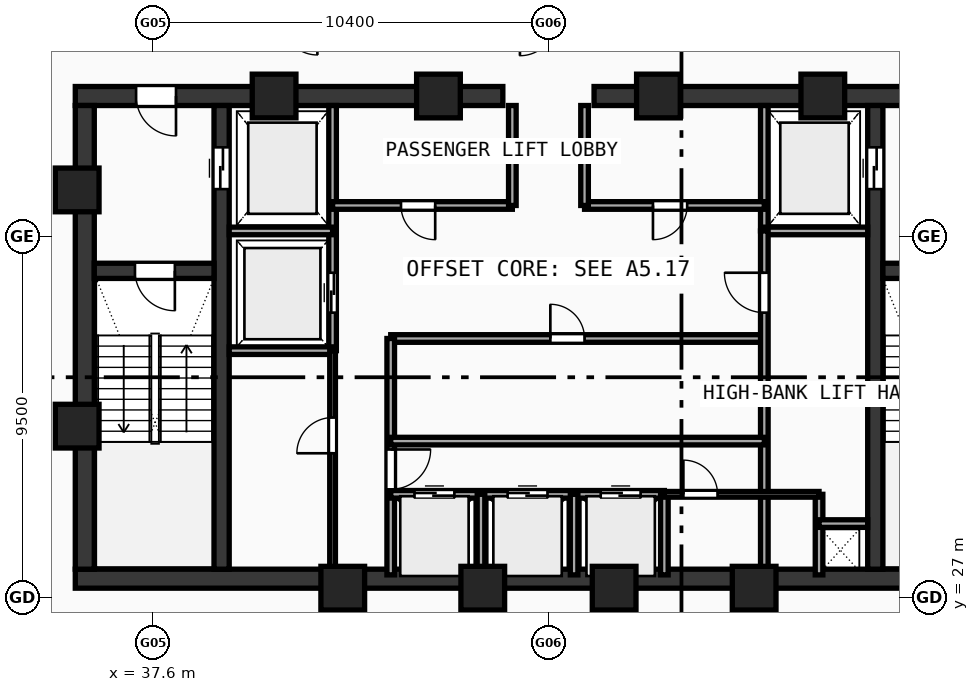
"""IFC4 building model, lengths in metres.
Left out: names, types, materials, properties, quantities, classifications, styles, units other than length and angle.
Written with IfcOpenShell. Run it as: python <this file> out.ifc"""

import sys

from ifc_helpers import new_model, si_unit, direction, frame, frame_2d, origin, origin_with_axes, origin_2d, place, context, subcontext, project, spatial, rectangle, hollow_rectangle, extrude, source, transform, mapped, element, fill, save


model = new_model("IFC4")
c1 = context("Model", 3, precision=1e-05, world=origin(), true_north=direction((0.0, 1.0)))
c2 = subcontext(c1, "Body", "Model", "MODEL_VIEW")
j1 = project(units=[si_unit("LENGTHUNIT", "METRE"), si_unit("PLANEANGLEUNIT", "RADIAN")], contexts=[c1])
p1 = place(None, origin())
s1 = spatial("IfcSite", under=j1, at=p1, CompositionType="ELEMENT")
p2 = place(p1, origin())
s2 = spatial("IfcBuilding", under=s1, at=p2, CompositionType="ELEMENT")
p3 = place(p2, frame((0.0, 0.0, 259.45)))
s3 = spatial("IfcBuildingStorey", under=s2, at=p3, CompositionType="ELEMENT", Elevation=259.45)
p4 = place(p3, frame((35.55, 27.5, 0.0), z_axis=(0.0, 0.0, 1.0), x_axis=(1.0, 0.0, 0.0)))
e1 = element("IfcWall", 1, at=p4, inside=s3, PredefinedType="SHEAR", context=c2, shape_type="SweptSolid", body=[
    extrude(rectangle(XDim=24.9, YDim=0.5, at=frame_2d((12.45, 0.0))), origin(), (0.0, 0.0, 1.0), 3.47),
])
p5 = place(p3, frame((35.55, 40.2, 0.0), z_axis=(0.0, 0.0, 1.0), x_axis=(1.0, 0.0, 0.0)))
e2 = element("IfcWall", 2, at=p5, inside=s3, PredefinedType="SHEAR", context=c2, shape_type="SweptSolid", body=[
    extrude(rectangle(XDim=11.25, YDim=0.5, at=frame_2d((5.625, 0.0))), origin(), (0.0, 0.0, 1.0), 3.47),
])
p6 = place(p5, frame((1.6, 0.0, 0.0)))
e3 = element("IfcOpeningElement", 3, at=p6, cuts=e2, PredefinedType="OPENING", context=c2, shape_type="SweptSolid", body=[
    extrude(rectangle(XDim=1.05, YDim=2.1, at=frame_2d((0.525, 1.05))), frame((0.0, 0.26, 0.0), z_axis=(0.0, -1.0, 0.0), x_axis=(1.0, 0.0, 0.0)), (0.0, 0.0, 1.0), 0.52),
])
p7 = place(p3, frame((49.2, 40.2, 0.0), z_axis=(0.0, 0.0, 1.0), x_axis=(1.0, 0.0, 0.0)))
e4 = element("IfcWall", 4, at=p7, inside=s3, PredefinedType="SHEAR", context=c2, shape_type="SweptSolid", body=[
    extrude(rectangle(XDim=11.25, YDim=0.5, at=frame_2d((5.625, 0.0))), origin(), (0.0, 0.0, 1.0), 3.47),
])
p8 = place(p7, frame((8.6, 0.0, 0.0)))
e5 = element("IfcOpeningElement", 5, at=p8, cuts=e4, PredefinedType="OPENING", context=c2, shape_type="SweptSolid", body=[
    extrude(rectangle(XDim=1.05, YDim=2.1, at=frame_2d((0.525, 1.05))), frame((0.0, 0.26, 0.0), z_axis=(0.0, -1.0, 0.0), x_axis=(1.0, 0.0, 0.0)), (0.0, 0.0, 1.0), 0.52),
])
p9 = place(p3, frame((35.8, 27.75, 0.0), z_axis=(0.0, 0.0, 1.0), x_axis=(0.0, 1.0, 0.0)))
e6 = element("IfcWall", 6, at=p9, inside=s3, PredefinedType="SHEAR", context=c2, shape_type="SweptSolid", body=[
    extrude(rectangle(XDim=12.2, YDim=0.5, at=frame_2d((6.1, 0.0))), origin(), (0.0, 0.0, 1.0), 3.47),
])
p10 = place(p3, frame((39.4, 27.75, 0.0), z_axis=(0.0, 0.0, 1.0), x_axis=(0.0, 1.0, 0.0)))
e7 = element("IfcWall", 7, at=p10, inside=s3, PredefinedType="SHEAR", context=c2, shape_type="SweptSolid", body=[
    extrude(rectangle(XDim=12.2, YDim=0.4, at=frame_2d((6.1, 0.0))), origin(), (0.0, 0.0, 1.0), 3.47),
])
p11 = place(p10, frame((10.0, 0.0, 0.0)))
e8 = element("IfcOpeningElement", 8, at=p11, cuts=e7, PredefinedType="OPENING", context=c2, shape_type="SweptSolid", body=[
    extrude(rectangle(XDim=1.1, YDim=2.1, at=frame_2d((0.55, 1.05))), frame((0.0, 0.21, 0.0), z_axis=(0.0, -1.0, 0.0), x_axis=(1.0, 0.0, 0.0)), (0.0, 0.0, 1.0), 0.42),
])
p12 = place(p3, frame((56.6, 27.75, 0.0), z_axis=(0.0, 0.0, 1.0), x_axis=(0.0, 1.0, 0.0)))
e9 = element("IfcWall", 9, at=p12, inside=s3, PredefinedType="SHEAR", context=c2, shape_type="SweptSolid", body=[
    extrude(rectangle(XDim=12.2, YDim=0.4, at=frame_2d((6.1, 0.0))), origin(), (0.0, 0.0, 1.0), 3.47),
])
p13 = place(p12, frame((10.0, 0.0, 0.0)))
e10 = element("IfcOpeningElement", 10, at=p13, cuts=e9, PredefinedType="OPENING", context=c2, shape_type="SweptSolid", body=[
    extrude(rectangle(XDim=1.1, YDim=2.1, at=frame_2d((0.55, 1.05))), frame((0.0, 0.21, 0.0), z_axis=(0.0, -1.0, 0.0), x_axis=(1.0, 0.0, 0.0)), (0.0, 0.0, 1.0), 0.42),
])
p14 = place(p3, frame((36.05, 35.6, 0.0), z_axis=(0.0, 0.0, 1.0), x_axis=(1.0, 0.0, 0.0)))
e11 = element("IfcWall", 11, at=p14, inside=s3, PredefinedType="SHEAR", context=c2, shape_type="SweptSolid", body=[
    extrude(rectangle(XDim=3.15, YDim=0.4, at=frame_2d((1.575, 0.0))), origin(), (0.0, 0.0, 1.0), 3.47),
])
p15 = place(p14, frame((1.07, 0.0, 0.0)))
e12 = element("IfcOpeningElement", 12, at=p15, cuts=e11, PredefinedType="OPENING", context=c2, shape_type="SweptSolid", body=[
    extrude(rectangle(XDim=1.05, YDim=2.1, at=frame_2d((0.525, 1.05))), frame((0.0, 0.21, 0.0), z_axis=(0.0, -1.0, 0.0), x_axis=(1.0, 0.0, 0.0)), (0.0, 0.0, 1.0), 0.42),
])
p16 = place(p3, frame((56.8, 35.6, 0.0), z_axis=(0.0, 0.0, 1.0), x_axis=(1.0, 0.0, 0.0)))
e13 = element("IfcWall", 13, at=p16, inside=s3, PredefinedType="SHEAR", context=c2, shape_type="SweptSolid", body=[
    extrude(rectangle(XDim=3.15, YDim=0.4, at=frame_2d((1.575, 0.0))), origin(), (0.0, 0.0, 1.0), 3.47),
])
p17 = place(p16, frame((1.02, 0.0, 0.0)))
e14 = element("IfcOpeningElement", 14, at=p17, cuts=e13, PredefinedType="OPENING", context=c2, shape_type="SweptSolid", body=[
    extrude(rectangle(XDim=1.05, YDim=2.1, at=frame_2d((0.525, 1.05))), frame((0.0, 0.21, 0.0), z_axis=(0.0, -1.0, 0.0), x_axis=(1.0, 0.0, 0.0)), (0.0, 0.0, 1.0), 0.42),
])
m1 = source(origin(), c2, "Body", "SweptSolid", [
    extrude(hollow_rectangle(XDim=1.15, YDim=1.15, WallThickness=0.048, at=origin_2d()), origin(), (0.0, 0.0, 1.0), 3.73),
])
for number, where, z_axis, x_axis in (
    (15, (42.588, 27.25, -0.26), (0.0, 0.0, 1.0), (1.0, 0.0, 0.0)),
    (16, (46.272, 27.25, -0.26), (0.0, 0.0, 1.0), (1.0, 0.0, 0.0)),
    (17, (49.729, 27.25, -0.26), (0.0, 0.0, 1.0), (1.0, 0.0, 0.0)),
    (18, (53.412, 27.25, -0.26), (0.0, 0.0, 1.0), (1.0, 0.0, 0.0)),
    (19, (55.219, 40.2, -0.26), (0.0, 0.0, 1.0), (1.0, 0.0, 0.0)),
    (20, (50.894, 40.2, -0.26), (0.0, 0.0, 1.0), (1.0, 0.0, 0.0)),
    (21, (45.106, 40.2, -0.26), (0.0, 0.0, 1.0), (1.0, 0.0, 0.0)),
    (22, (40.781, 40.2, -0.26), (0.0, 0.0, 1.0), (1.0, 0.0, 0.0)),
    (23, (35.6, 37.729, -0.26), (0.0, 0.0, 1.0), (1.0, 0.0, 0.0)),
    (24, (35.6, 31.513, -0.26), (0.0, 0.0, 1.0), (1.0, 0.0, 0.0)),
):
    element("IfcColumn", number, at=place(p3, frame(where, z_axis=z_axis, x_axis=x_axis)), inside=s3, PredefinedType="COLUMN", context=c2, shape_type="MappedRepresentation", body=[
        mapped(m1, transform((0.0, 0.0, 0.0), scale=1.0)),
    ])
p18 = place(p3, frame((42.32, 33.5, 0.0), z_axis=(0.0, 0.0, 1.0), x_axis=(0.0, 1.0, 0.0)))
e25 = element("IfcWall", 25, at=p18, inside=s3, PredefinedType="SOLIDWALL", context=c2, shape_type="SweptSolid", body=[
    extrude(rectangle(XDim=6.45, YDim=0.2, at=frame_2d((3.225, 0.0))), origin(), (0.0, 0.0, 1.0), 3.47),
])
p19 = place(p18, frame((1.0, 0.0, 0.0)))
e26 = element("IfcOpeningElement", 26, at=p19, cuts=e25, PredefinedType="OPENING", context=c2, shape_type="SweptSolid", body=[
    extrude(rectangle(XDim=1.05, YDim=2.1, at=frame_2d((0.525, 1.05))), frame((0.0, 0.11, 0.0), z_axis=(0.0, -1.0, 0.0), x_axis=(1.0, 0.0, 0.0)), (0.0, 0.0, 1.0), 0.22),
])
for number, where, z_axis, x_axis in (
    (27, (39.6, 36.65, 0.0), (0.0, 0.0, 1.0), (1.0, 0.0, 0.0)),
    (28, (39.6, 33.5, 0.0), (0.0, 0.0, 1.0), (1.0, 0.0, 0.0)),
):
    element("IfcWall", number, at=place(p3, frame(where, z_axis=z_axis, x_axis=x_axis)), inside=s3, PredefinedType="SOLIDWALL", context=c2, shape_type="SweptSolid", body=[
        extrude(rectangle(XDim=2.72, YDim=0.2, at=frame_2d((1.36, 0.0))), origin(), (0.0, 0.0, 1.0), 3.47),
    ])
p20 = place(p3, frame((53.68, 36.65, 0.0), z_axis=(0.0, 0.0, 1.0), x_axis=(0.0, 1.0, 0.0)))
e29 = element("IfcWall", 29, at=p20, inside=s3, PredefinedType="SOLIDWALL", context=c2, shape_type="SweptSolid", body=[
    extrude(rectangle(XDim=3.3, YDim=0.2, at=frame_2d((1.65, 0.0))), origin(), (0.0, 0.0, 1.0), 3.47),
])
p21 = place(p3, frame((53.68, 36.65, 0.0), z_axis=(0.0, 0.0, 1.0), x_axis=(1.0, 0.0, 0.0)))
e30 = element("IfcWall", 30, at=p21, inside=s3, PredefinedType="SOLIDWALL", context=c2, shape_type="SweptSolid", body=[
    extrude(rectangle(XDim=2.72, YDim=0.2, at=frame_2d((1.36, 0.0))), origin(), (0.0, 0.0, 1.0), 3.47),
])
p22 = place(p3, frame((42.32, 37.32, 0.0), z_axis=(0.0, 0.0, 1.0), x_axis=(1.0, 0.0, 0.0)))
e31 = element("IfcWall", 31, at=p22, inside=s3, PredefinedType="SOLIDWALL", context=c2, shape_type="SweptSolid", body=[
    extrude(rectangle(XDim=4.73, YDim=0.2, at=frame_2d((2.365, 0.0))), origin(), (0.0, 0.0, 1.0), 3.47),
])
p23 = place(p22, frame((1.8, 0.0, 0.0)))
e32 = element("IfcOpeningElement", 32, at=p23, cuts=e31, PredefinedType="OPENING", context=c2, shape_type="SweptSolid", body=[
    extrude(rectangle(XDim=0.9, YDim=2.1, at=frame_2d((0.45, 1.05))), frame((0.0, 0.11, 0.0), z_axis=(0.0, -1.0, 0.0), x_axis=(1.0, 0.0, 0.0)), (0.0, 0.0, 1.0), 0.22),
])
p24 = place(p3, frame((48.95, 37.32, 0.0), z_axis=(0.0, 0.0, 1.0), x_axis=(1.0, 0.0, 0.0)))
e33 = element("IfcWall", 33, at=p24, inside=s3, PredefinedType="SOLIDWALL", context=c2, shape_type="SweptSolid", body=[
    extrude(rectangle(XDim=4.73, YDim=0.2, at=frame_2d((2.365, 0.0))), origin(), (0.0, 0.0, 1.0), 3.47),
])
p25 = place(p24, frame((1.8, 0.0, 0.0)))
e34 = element("IfcOpeningElement", 34, at=p25, cuts=e33, PredefinedType="OPENING", context=c2, shape_type="SweptSolid", body=[
    extrude(rectangle(XDim=0.9, YDim=2.1, at=frame_2d((0.45, 1.05))), frame((0.0, 0.11, 0.0), z_axis=(0.0, -1.0, 0.0), x_axis=(1.0, 0.0, 0.0)), (0.0, 0.0, 1.0), 0.22),
])
for number, where, z_axis, x_axis in (
    (35, (47.05, 37.32, 0.0), (0.0, 0.0, 1.0), (0.0, 1.0, 0.0)),
    (36, (48.95, 37.32, 0.0), (0.0, 0.0, 1.0), (0.0, 1.0, 0.0)),
):
    element("IfcWall", number, at=place(p3, frame(where, z_axis=z_axis, x_axis=x_axis)), inside=s3, PredefinedType="SOLIDWALL", context=c2, shape_type="SweptSolid", body=[
        extrude(rectangle(XDim=2.63, YDim=0.2, at=frame_2d((1.315, 0.0))), origin(), (0.0, 0.0, 1.0), 3.47),
    ])
p26 = place(p3, frame((43.85, 33.82, 0.0), z_axis=(0.0, 0.0, 1.0), x_axis=(1.0, 0.0, 0.0)))
e37 = element("IfcWall", 37, at=p26, inside=s3, PredefinedType="SOLIDWALL", context=c2, shape_type="SweptSolid", body=[
    extrude(rectangle(XDim=9.83, YDim=0.2, at=frame_2d((4.915, 0.0))), origin(), (0.0, 0.0, 1.0), 3.47),
])
p27 = place(p26, frame((4.2, 0.0, 0.0)))
e38 = element("IfcOpeningElement", 38, at=p27, cuts=e37, PredefinedType="OPENING", context=c2, shape_type="SweptSolid", body=[
    extrude(rectangle(XDim=0.9, YDim=2.1, at=frame_2d((0.45, 1.05))), frame((0.0, 0.11, 0.0), z_axis=(0.0, -1.0, 0.0), x_axis=(1.0, 0.0, 0.0)), (0.0, 0.0, 1.0), 0.22),
])
p28 = place(p3, frame((43.85, 27.6, 0.0), z_axis=(0.0, 0.0, 1.0), x_axis=(0.0, 1.0, 0.0)))
e39 = element("IfcWall", 39, at=p28, inside=s3, PredefinedType="SOLIDWALL", context=c2, shape_type="SweptSolid", body=[
    extrude(rectangle(XDim=6.22, YDim=0.2, at=frame_2d((3.11, 0.0))), origin(), (0.0, 0.0, 1.0), 3.47),
])
p29 = place(p28, frame((2.25, 0.0, 0.0)))
e40 = element("IfcOpeningElement", 40, at=p29, cuts=e39, PredefinedType="OPENING", context=c2, shape_type="SweptSolid", body=[
    extrude(rectangle(XDim=1.05, YDim=2.1, at=frame_2d((0.525, 1.05))), frame((0.0, 0.11, 0.0), z_axis=(0.0, -1.0, 0.0), x_axis=(1.0, 0.0, 0.0)), (0.0, 0.0, 1.0), 0.22),
])
p30 = place(p3, frame((53.68, 27.6, 0.0), z_axis=(0.0, 0.0, 1.0), x_axis=(0.0, 1.0, 0.0)))
e41 = element("IfcWall", 41, at=p30, inside=s3, PredefinedType="SOLIDWALL", context=c2, shape_type="SweptSolid", body=[
    extrude(rectangle(XDim=9.05, YDim=0.2, at=frame_2d((4.525, 0.0))), origin(), (0.0, 0.0, 1.0), 3.47),
])
p31 = place(p30, frame((6.9, 0.0, 0.0)))
e42 = element("IfcOpeningElement", 42, at=p31, cuts=e41, PredefinedType="OPENING", context=c2, shape_type="SweptSolid", body=[
    extrude(rectangle(XDim=1.05, YDim=2.1, at=frame_2d((0.525, 1.05))), frame((0.0, 0.11, 0.0), z_axis=(0.0, -1.0, 0.0), x_axis=(1.0, 0.0, 0.0)), (0.0, 0.0, 1.0), 0.22),
])
p32 = place(p3, frame((43.85, 29.72, 0.0), z_axis=(0.0, 0.0, 1.0), x_axis=(1.0, 0.0, 0.0)))
e43 = element("IfcWall", 43, at=p32, inside=s3, PredefinedType="SOLIDWALL", context=c2, shape_type="SweptSolid", body=[
    extrude(rectangle(XDim=7.2, YDim=0.2, at=frame_2d((3.6, 0.0))), origin(), (0.0, 0.0, 1.0), 3.47),
])
p33 = place(p32, frame((0.625, 0.0, 0.0)))
e44 = element("IfcOpeningElement", 44, at=p33, cuts=e43, PredefinedType="OPENING", context=c2, shape_type="SweptSolid", body=[
    extrude(rectangle(XDim=1.05, YDim=2.1, at=frame_2d((0.525, 1.05))), frame((0.0, 0.11, 0.0), z_axis=(0.0, -1.0, 0.0), x_axis=(1.0, 0.0, 0.0)), (0.0, 0.0, 1.0), 0.22),
])
p34 = place(p32, frame((3.075, 0.0, 0.0)))
e45 = element("IfcOpeningElement", 45, at=p34, cuts=e43, PredefinedType="OPENING", context=c2, shape_type="SweptSolid", body=[
    extrude(rectangle(XDim=1.05, YDim=2.1, at=frame_2d((0.525, 1.05))), frame((0.0, 0.11, 0.0), z_axis=(0.0, -1.0, 0.0), x_axis=(1.0, 0.0, 0.0)), (0.0, 0.0, 1.0), 0.22),
])
p35 = place(p32, frame((5.525, 0.0, 0.0)))
e46 = element("IfcOpeningElement", 46, at=p35, cuts=e43, PredefinedType="OPENING", context=c2, shape_type="SweptSolid", body=[
    extrude(rectangle(XDim=1.05, YDim=2.1, at=frame_2d((0.525, 1.05))), frame((0.0, 0.11, 0.0), z_axis=(0.0, -1.0, 0.0), x_axis=(1.0, 0.0, 0.0)), (0.0, 0.0, 1.0), 0.22),
])
p36 = place(p3, frame((51.05, 27.6, 0.0), z_axis=(0.0, 0.0, 1.0), x_axis=(0.0, 1.0, 0.0)))
e47 = element("IfcWall", 47, at=p36, inside=s3, PredefinedType="SOLIDWALL", context=c2, shape_type="SweptSolid", body=[
    extrude(rectangle(XDim=2.12, YDim=0.2, at=frame_2d((1.06, 0.0))), origin(), (0.0, 0.0, 1.0), 3.47),
])
p37 = place(p3, frame((43.85, 31.12, 0.0), z_axis=(0.0, 0.0, 1.0), x_axis=(1.0, 0.0, 0.0)))
e48 = element("IfcWall", 48, at=p37, inside=s3, PredefinedType="SOLIDWALL", context=c2, shape_type="SweptSolid", body=[
    extrude(rectangle(XDim=9.83, YDim=0.2, at=frame_2d((4.915, 0.0))), origin(), (0.0, 0.0, 1.0), 3.47),
])
for number, where, z_axis, x_axis in (
    (49, (46.225, 27.6, 0.0), (0.0, 0.0, 1.0), (0.0, 1.0, 0.0)),
    (50, (48.675, 27.6, 0.0), (0.0, 0.0, 1.0), (0.0, 1.0, 0.0)),
    (51, (55.12, 27.6, 0.0), (0.0, 0.0, 1.0), (0.0, 1.0, 0.0)),
):
    element("IfcWall", number, at=place(p3, frame(where, z_axis=z_axis, x_axis=x_axis)), inside=s3, PredefinedType="SOLIDWALL", context=c2, shape_type="SweptSolid", body=[
        extrude(rectangle(XDim=2.12, YDim=0.2, at=frame_2d((1.06, 0.0))), origin(), (0.0, 0.0, 1.0), 3.47),
    ])
p38 = place(p3, frame((55.12, 28.95, 0.0), z_axis=(0.0, 0.0, 1.0), x_axis=(1.0, 0.0, 0.0)))
e52 = element("IfcWall", 52, at=p38, inside=s3, PredefinedType="SOLIDWALL", context=c2, shape_type="SweptSolid", body=[
    extrude(rectangle(XDim=1.28, YDim=0.2, at=frame_2d((0.64, 0.0))), origin(), (0.0, 0.0, 1.0), 3.47),
])
p39 = place(p3, frame((42.32, 27.6, 0.0), z_axis=(0.0, 0.0, 1.0), x_axis=(0.0, 1.0, 0.0)))
e53 = element("IfcWall", 53, at=p39, inside=s3, PredefinedType="PARTITIONING", context=c2, shape_type="SweptSolid", body=[
    extrude(rectangle(XDim=5.9, YDim=0.15, at=frame_2d((2.95, 0.0))), origin(), (0.0, 0.0, 1.0), 3.47),
])
p40 = place(p39, frame((3.2, 0.0, 0.0)))
e54 = element("IfcOpeningElement", 54, at=p40, cuts=e53, PredefinedType="OPENING", context=c2, shape_type="SweptSolid", body=[
    extrude(rectangle(XDim=0.94, YDim=2.1, at=frame_2d((0.47, 1.05))), frame((0.0, 0.085, 0.0), z_axis=(0.0, -1.0, 0.0), x_axis=(1.0, 0.0, 0.0)), (0.0, 0.0, 1.0), 0.17),
])
p41 = place(p3, frame((51.05, 29.72, 0.0), z_axis=(0.0, 0.0, 1.0), x_axis=(1.0, 0.0, 0.0)))
e55 = element("IfcWall", 55, at=p41, inside=s3, PredefinedType="PARTITIONING", context=c2, shape_type="SweptSolid", body=[
    extrude(rectangle(XDim=4.07, YDim=0.15, at=frame_2d((2.035, 0.0))), origin(), (0.0, 0.0, 1.0), 3.47),
])
p42 = place(p41, frame((0.5, 0.0, 0.0)))
e56 = element("IfcOpeningElement", 56, at=p42, cuts=e55, PredefinedType="OPENING", context=c2, shape_type="SweptSolid", body=[
    extrude(rectangle(XDim=0.9, YDim=2.1, at=frame_2d((0.45, 1.05))), frame((0.0, 0.085, 0.0), z_axis=(0.0, -1.0, 0.0), x_axis=(1.0, 0.0, 0.0)), (0.0, 0.0, 1.0), 0.17),
])
m2 = source(origin(), c2, "Body", "SweptSolid", [
    extrude(rectangle(XDim=1.05, YDim=2.1, at=frame_2d((0.525, 1.05))), frame((0.0, 0.025, 0.0), z_axis=(0.0, -1.0, 0.0), x_axis=(1.0, 0.0, 0.0)), (0.0, 0.0, 1.0), 0.05),
])
p43 = place(p15, frame((1.05, 0.0, 0.0), z_axis=(0.0, 0.0, 1.0), x_axis=(-1.0, 0.0, 0.0)))
e57 = element("IfcDoor", 57, at=p43, inside=s3, OperationType="SINGLE_SWING_LEFT", PredefinedType="DOOR", context=c2, shape_type="MappedRepresentation", body=[
    mapped(m2, transform((0.0, 0.0, 0.0), scale=1.0)),
])
fill(e12, e57)
p44 = place(p6, frame((1.05, 0.0, 0.0), z_axis=(0.0, 0.0, 1.0), x_axis=(-1.0, 0.0, 0.0)))
e58 = element("IfcDoor", 58, at=p44, inside=s3, OperationType="SINGLE_SWING_LEFT", PredefinedType="DOOR", context=c2, shape_type="MappedRepresentation", body=[
    mapped(m2, transform((0.0, 0.0, 0.0), scale=1.0)),
])
fill(e3, e58)
m3 = source(origin(), c2, "Body", "SweptSolid", [
    extrude(rectangle(XDim=1.1, YDim=2.1, at=frame_2d((0.55, 1.05))), frame((0.0, 0.025, 0.0), z_axis=(0.0, -1.0, 0.0), x_axis=(1.0, 0.0, 0.0)), (0.0, 0.0, 1.0), 0.05),
])
p45 = place(p11, frame((1.1, 0.0, 0.0), z_axis=(0.0, 0.0, 1.0), x_axis=(-1.0, 0.0, 0.0)))
e59 = element("IfcDoor", 59, at=p45, inside=s3, OperationType="DOUBLE_DOOR_SLIDING", PredefinedType="DOOR", context=c2, shape_type="MappedRepresentation", body=[
    mapped(m3, transform((0.0, 0.0, 0.0), scale=1.0)),
])
fill(e8, e59)
p46 = place(p13, origin_with_axes())
e60 = element("IfcDoor", 60, at=p46, inside=s3, OperationType="DOUBLE_DOOR_SLIDING", PredefinedType="DOOR", context=c2, shape_type="MappedRepresentation", body=[
    mapped(m3, transform((0.0, 0.0, 0.0), scale=1.0)),
])
fill(e10, e60)
p47 = place(p19, origin_with_axes())
e61 = element("IfcDoor", 61, at=p47, inside=s3, OperationType="DOUBLE_DOOR_SLIDING", PredefinedType="DOOR", context=c2, shape_type="MappedRepresentation", body=[
    mapped(m2, transform((0.0, 0.0, 0.0), scale=1.0)),
])
fill(e26, e61)
m4 = source(origin(), c2, "Body", "SweptSolid", [
    extrude(rectangle(XDim=0.9, YDim=2.1, at=frame_2d((0.45, 1.05))), frame((0.0, 0.025, 0.0), z_axis=(0.0, -1.0, 0.0), x_axis=(1.0, 0.0, 0.0)), (0.0, 0.0, 1.0), 0.05),
])
p48 = place(p23, frame((0.9, 0.0, 0.0), z_axis=(0.0, 0.0, 1.0), x_axis=(-1.0, 0.0, 0.0)))
e62 = element("IfcDoor", 62, at=p48, inside=s3, OperationType="SINGLE_SWING_LEFT", PredefinedType="DOOR", context=c2, shape_type="MappedRepresentation", body=[
    mapped(m4, transform((0.0, 0.0, 0.0), scale=1.0)),
])
fill(e32, e62)
p49 = place(p25, frame((0.9, 0.0, 0.0), z_axis=(0.0, 0.0, 1.0), x_axis=(-1.0, 0.0, 0.0)))
e63 = element("IfcDoor", 63, at=p49, inside=s3, OperationType="SINGLE_SWING_RIGHT", PredefinedType="DOOR", context=c2, shape_type="MappedRepresentation", body=[
    mapped(m4, transform((0.0, 0.0, 0.0), scale=1.0)),
])
fill(e34, e63)
p50 = place(p27, origin_with_axes())
e64 = element("IfcDoor", 64, at=p50, inside=s3, OperationType="SINGLE_SWING_LEFT", PredefinedType="DOOR", context=c2, shape_type="MappedRepresentation", body=[
    mapped(m4, transform((0.0, 0.0, 0.0), scale=1.0)),
])
fill(e38, e64)
p51 = place(p29, frame((1.05, 0.0, 0.0), z_axis=(0.0, 0.0, 1.0), x_axis=(-1.0, 0.0, 0.0)))
e65 = element("IfcDoor", 65, at=p51, inside=s3, OperationType="SINGLE_SWING_LEFT", PredefinedType="DOOR", context=c2, shape_type="MappedRepresentation", body=[
    mapped(m2, transform((0.0, 0.0, 0.0), scale=1.0)),
])
fill(e40, e65)
p52 = place(p31, origin_with_axes())
e66 = element("IfcDoor", 66, at=p52, inside=s3, OperationType="SINGLE_SWING_RIGHT", PredefinedType="DOOR", context=c2, shape_type="MappedRepresentation", body=[
    mapped(m2, transform((0.0, 0.0, 0.0), scale=1.0)),
])
fill(e42, e66)
p53 = place(p33, origin_with_axes())
e67 = element("IfcDoor", 67, at=p53, inside=s3, OperationType="DOUBLE_DOOR_SLIDING", PredefinedType="DOOR", context=c2, shape_type="MappedRepresentation", body=[
    mapped(m2, transform((0.0, 0.0, 0.0), scale=1.0)),
])
fill(e44, e67)
p54 = place(p34, origin_with_axes())
e68 = element("IfcDoor", 68, at=p54, inside=s3, OperationType="DOUBLE_DOOR_SLIDING", PredefinedType="DOOR", context=c2, shape_type="MappedRepresentation", body=[
    mapped(m2, transform((0.0, 0.0, 0.0), scale=1.0)),
])
fill(e45, e68)
p55 = place(p35, origin_with_axes())
e69 = element("IfcDoor", 69, at=p55, inside=s3, OperationType="DOUBLE_DOOR_SLIDING", PredefinedType="DOOR", context=c2, shape_type="MappedRepresentation", body=[
    mapped(m2, transform((0.0, 0.0, 0.0), scale=1.0)),
])
fill(e46, e69)
m5 = source(origin(), c2, "Body", "SweptSolid", [
    extrude(rectangle(XDim=0.94, YDim=2.1, at=frame_2d((0.47, 1.05))), frame((0.0, 0.025, 0.0), z_axis=(0.0, -1.0, 0.0), x_axis=(1.0, 0.0, 0.0)), (0.0, 0.0, 1.0), 0.05),
])
p56 = place(p40, origin_with_axes())
e70 = element("IfcDoor", 70, at=p56, inside=s3, OperationType="SINGLE_SWING_LEFT", PredefinedType="DOOR", context=c2, shape_type="MappedRepresentation", body=[
    mapped(m5, transform((0.0, 0.0, 0.0), scale=1.0)),
])
fill(e54, e70)
p57 = place(p42, origin_with_axes())
e71 = element("IfcDoor", 71, at=p57, inside=s3, OperationType="SINGLE_SWING_LEFT", PredefinedType="DOOR", context=c2, shape_type="MappedRepresentation", body=[
    mapped(m4, transform((0.0, 0.0, 0.0), scale=1.0)),
])
fill(e56, e71)
save(model, sys.argv[1])
